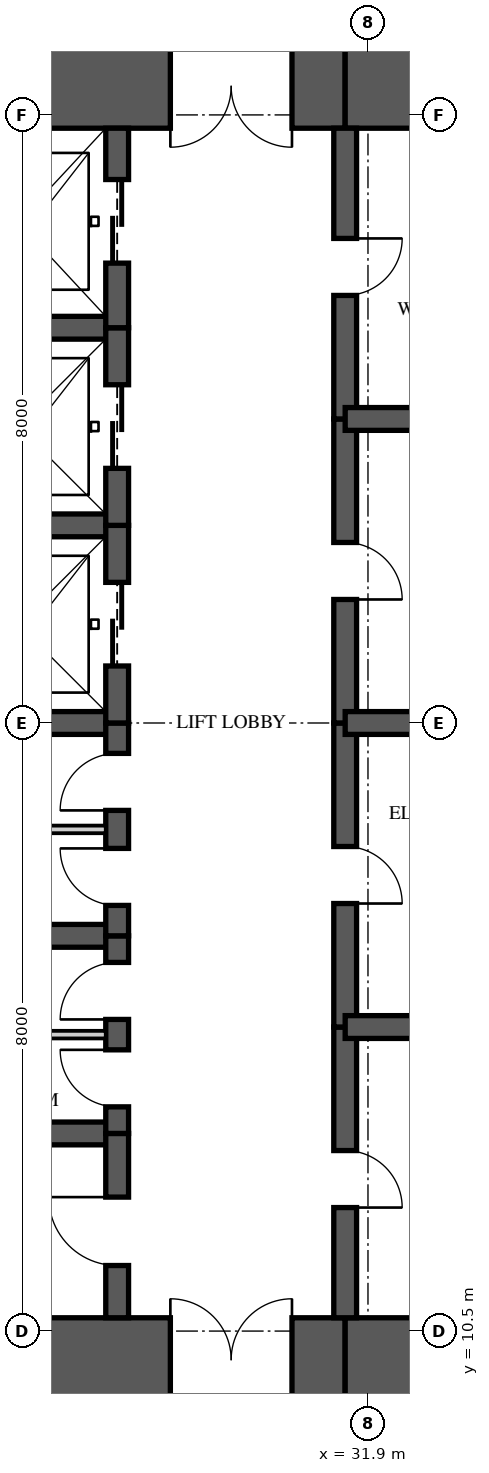
"""IFC4 building model, lengths in metres.
Left out: names, types, materials, properties, quantities, classifications, styles, units other than length and angle.
Written with IfcOpenShell. Run it as: python <this file> out.ifc"""

import sys

from ifc_helpers import new_model, si_unit, direction, frame, frame_2d, origin, place, context, subcontext, project, spatial, rectangle, extrude, element, fill, save


model = new_model("IFC4")
c1 = context("Model", 3, precision=1e-05, world=origin(), true_north=direction((0.0, 1.0)))
c2 = subcontext(c1, "Body", "Model", "MODEL_VIEW")
j1 = project(units=[si_unit("LENGTHUNIT", "METRE"), si_unit("PLANEANGLEUNIT", "RADIAN")], contexts=[c1])
p1 = place(None, origin())
s1 = spatial("IfcSite", under=j1, at=p1, CompositionType="ELEMENT")
p2 = place(p1, origin())
s2 = spatial("IfcBuilding", under=s1, at=p2, CompositionType="ELEMENT")
p3 = place(p2, frame((0.0, 0.0, 238.95)))
s3 = spatial("IfcBuildingStorey", under=s2, at=p3, CompositionType="ELEMENT", Elevation=238.95)
p4 = place(p3, frame((26.0, 10.125, 0.0), z_axis=(0.0, 0.0, 1.0), x_axis=(1.0, 0.0, 0.0)))
e1 = element("IfcWall", 1, at=p4, inside=s3, PredefinedType="SHEAR", context=c2, shape_type="SweptSolid", body=[
    extrude(rectangle(XDim=5.6, YDim=1.1, at=frame_2d((2.8, 0.0))), origin(), (0.0, 0.0, 1.0), 3.5),
])
p5 = place(p4, frame((3.3, 0.0, 0.0)))
e2 = element("IfcOpeningElement", 2, at=p5, cuts=e1, PredefinedType="OPENING", context=c2, shape_type="SweptSolid", body=[
    extrude(rectangle(XDim=1.6, YDim=2.1, at=frame_2d((0.8, 1.05))), frame((0.0, 0.56, 0.0), z_axis=(0.0, -1.0, 0.0), x_axis=(1.0, 0.0, 0.0)), (0.0, 0.0, 1.0), 1.12),
])
for number, where, z_axis, x_axis in (
    (3, (31.6, 10.125, 0.0), (0.0, 0.0, 1.0), (1.0, 0.0, 0.0)),
    (4, (35.9, 26.875, 0.0), (0.0, 0.0, 1.0), (-1.0, 0.0, 0.0)),
):
    element("IfcWall", number, at=place(p3, frame(where, z_axis=z_axis, x_axis=x_axis)), inside=s3, PredefinedType="SHEAR", context=c2, shape_type="SweptSolid", body=[
        extrude(rectangle(XDim=4.3, YDim=1.1, at=frame_2d((2.15, 0.0))), origin(), (0.0, 0.0, 1.0), 3.5),
    ])
p6 = place(p3, frame((31.6, 26.875, 0.0), z_axis=(0.0, 0.0, 1.0), x_axis=(-1.0, 0.0, 0.0)))
e5 = element("IfcWall", 5, at=p6, inside=s3, PredefinedType="SHEAR", context=c2, shape_type="SweptSolid", body=[
    extrude(rectangle(XDim=5.6, YDim=1.1, at=frame_2d((2.8, 0.0))), origin(), (0.0, 0.0, 1.0), 3.5),
])
p7 = place(p6, frame((0.7, 0.0, 0.0)))
e6 = element("IfcOpeningElement", 6, at=p7, cuts=e5, PredefinedType="OPENING", context=c2, shape_type="SweptSolid", body=[
    extrude(rectangle(XDim=1.6, YDim=2.1, at=frame_2d((0.8, 1.05))), frame((0.0, 0.56, 0.0), z_axis=(0.0, -1.0, 0.0), x_axis=(1.0, 0.0, 0.0)), (0.0, 0.0, 1.0), 1.12),
])
p8 = place(p3, frame((28.6, 10.675, 0.0), z_axis=(0.0, 0.0, 1.0), x_axis=(0.0, 1.0, 0.0)))
e7 = element("IfcWall", 7, at=p8, inside=s3, PredefinedType="SHEAR", context=c2, shape_type="SweptSolid", body=[
    extrude(rectangle(XDim=2.425, YDim=0.3, at=frame_2d((1.212, 0.0))), origin(), (0.0, 0.0, 1.0), 3.5),
])
p9 = place(p8, frame((0.688, 0.0, 0.0)))
e8 = element("IfcOpeningElement", 8, at=p9, cuts=e7, PredefinedType="OPENING", context=c2, shape_type="SweptSolid", body=[
    extrude(rectangle(XDim=0.9, YDim=2.1, at=frame_2d((0.45, 1.05))), frame((0.0, 0.16, 0.0), z_axis=(0.0, -1.0, 0.0), x_axis=(1.0, 0.0, 0.0)), (0.0, 0.0, 1.0), 0.32),
])
p10 = place(p3, frame((28.6, 13.1, 0.0), z_axis=(0.0, 0.0, 1.0), x_axis=(0.0, 1.0, 0.0)))
e9 = element("IfcWall", 9, at=p10, inside=s3, PredefinedType="SHEAR", context=c2, shape_type="SweptSolid", body=[
    extrude(rectangle(XDim=2.6, YDim=0.3, at=frame_2d((1.3, 0.0))), origin(), (0.0, 0.0, 1.0), 3.5),
])
p11 = place(p10, frame((0.35, 0.0, 0.0)))
e10 = element("IfcOpeningElement", 10, at=p11, cuts=e9, PredefinedType="OPENING", context=c2, shape_type="SweptSolid", body=[
    extrude(rectangle(XDim=0.75, YDim=2.1, at=frame_2d((0.375, 1.05))), frame((0.0, 0.16, 0.0), z_axis=(0.0, -1.0, 0.0), x_axis=(1.0, 0.0, 0.0)), (0.0, 0.0, 1.0), 0.32),
])
p12 = place(p10, frame((1.5, 0.0, 0.0)))
e11 = element("IfcOpeningElement", 11, at=p12, cuts=e9, PredefinedType="OPENING", context=c2, shape_type="SweptSolid", body=[
    extrude(rectangle(XDim=0.75, YDim=2.1, at=frame_2d((0.375, 1.05))), frame((0.0, 0.16, 0.0), z_axis=(0.0, -1.0, 0.0), x_axis=(1.0, 0.0, 0.0)), (0.0, 0.0, 1.0), 0.32),
])
p13 = place(p3, frame((28.6, 15.7, 0.0), z_axis=(0.0, 0.0, 1.0), x_axis=(0.0, 1.0, 0.0)))
e12 = element("IfcWall", 12, at=p13, inside=s3, PredefinedType="SHEAR", context=c2, shape_type="SweptSolid", body=[
    extrude(rectangle(XDim=2.8, YDim=0.3, at=frame_2d((1.4, 0.0))), origin(), (0.0, 0.0, 1.0), 3.5),
])
p14 = place(p13, frame((0.4, 0.0, 0.0)))
e13 = element("IfcOpeningElement", 13, at=p14, cuts=e12, PredefinedType="OPENING", context=c2, shape_type="SweptSolid", body=[
    extrude(rectangle(XDim=0.75, YDim=2.1, at=frame_2d((0.375, 1.05))), frame((0.0, 0.16, 0.0), z_axis=(0.0, -1.0, 0.0), x_axis=(1.0, 0.0, 0.0)), (0.0, 0.0, 1.0), 0.32),
])
p15 = place(p13, frame((1.65, 0.0, 0.0)))
e14 = element("IfcOpeningElement", 14, at=p15, cuts=e12, PredefinedType="OPENING", context=c2, shape_type="SweptSolid", body=[
    extrude(rectangle(XDim=0.75, YDim=2.1, at=frame_2d((0.375, 1.05))), frame((0.0, 0.16, 0.0), z_axis=(0.0, -1.0, 0.0), x_axis=(1.0, 0.0, 0.0)), (0.0, 0.0, 1.0), 0.32),
])
p16 = place(p3, frame((28.6, 18.5, 0.0), z_axis=(0.0, 0.0, 1.0), x_axis=(0.0, 1.0, 0.0)))
e15 = element("IfcWall", 15, at=p16, inside=s3, PredefinedType="SHEAR", context=c2, shape_type="SweptSolid", body=[
    extrude(rectangle(XDim=2.6, YDim=0.3, at=frame_2d((1.3, 0.0))), origin(), (0.0, 0.0, 1.0), 3.5),
])
p17 = place(p16, frame((0.75, 0.0, 0.0)))
e16 = element("IfcOpeningElement", 16, at=p17, cuts=e15, PredefinedType="OPENING", context=c2, shape_type="SweptSolid", body=[
    extrude(rectangle(XDim=1.1, YDim=2.1, at=frame_2d((0.55, 1.05))), frame((0.0, 0.16, 0.0), z_axis=(0.0, -1.0, 0.0), x_axis=(1.0, 0.0, 0.0)), (0.0, 0.0, 1.0), 0.32),
])
p18 = place(p3, frame((28.6, 21.1, 0.0), z_axis=(0.0, 0.0, 1.0), x_axis=(0.0, 1.0, 0.0)))
e17 = element("IfcWall", 17, at=p18, inside=s3, PredefinedType="SHEAR", context=c2, shape_type="SweptSolid", body=[
    extrude(rectangle(XDim=2.6, YDim=0.3, at=frame_2d((1.3, 0.0))), origin(), (0.0, 0.0, 1.0), 3.5),
])
p19 = place(p18, frame((0.75, 0.0, 0.0)))
e18 = element("IfcOpeningElement", 18, at=p19, cuts=e17, PredefinedType="OPENING", context=c2, shape_type="SweptSolid", body=[
    extrude(rectangle(XDim=1.1, YDim=2.1, at=frame_2d((0.55, 1.05))), frame((0.0, 0.16, 0.0), z_axis=(0.0, -1.0, 0.0), x_axis=(1.0, 0.0, 0.0)), (0.0, 0.0, 1.0), 0.32),
])
p20 = place(p3, frame((28.6, 23.7, 0.0), z_axis=(0.0, 0.0, 1.0), x_axis=(0.0, 1.0, 0.0)))
e19 = element("IfcWall", 19, at=p20, inside=s3, PredefinedType="SHEAR", context=c2, shape_type="SweptSolid", body=[
    extrude(rectangle(XDim=2.625, YDim=0.3, at=frame_2d((1.312, 0.0))), origin(), (0.0, 0.0, 1.0), 3.5),
])
p21 = place(p20, frame((0.85, 0.0, 0.0)))
e20 = element("IfcOpeningElement", 20, at=p21, cuts=e19, PredefinedType="OPENING", context=c2, shape_type="SweptSolid", body=[
    extrude(rectangle(XDim=1.1, YDim=2.1, at=frame_2d((0.55, 1.05))), frame((0.0, 0.16, 0.0), z_axis=(0.0, -1.0, 0.0), x_axis=(1.0, 0.0, 0.0)), (0.0, 0.0, 1.0), 0.32),
])
p22 = place(p3, frame((31.6, 10.675, 0.0), z_axis=(0.0, 0.0, 1.0), x_axis=(0.0, 1.0, 0.0)))
e21 = element("IfcWall", 21, at=p22, inside=s3, PredefinedType="SHEAR", context=c2, shape_type="SweptSolid", body=[
    extrude(rectangle(XDim=3.825, YDim=0.3, at=frame_2d((1.913, 0.0))), origin(), (0.0, 0.0, 1.0), 3.5),
])
p23 = place(p22, frame((1.45, 0.0, 0.0)))
e22 = element("IfcOpeningElement", 22, at=p23, cuts=e21, PredefinedType="OPENING", context=c2, shape_type="SweptSolid", body=[
    extrude(rectangle(XDim=0.75, YDim=2.1, at=frame_2d((0.375, 1.05))), frame((0.0, 0.16, 0.0), z_axis=(0.0, -1.0, 0.0), x_axis=(1.0, 0.0, 0.0)), (0.0, 0.0, 1.0), 0.32),
])
p24 = place(p3, frame((31.6, 14.5, 0.0), z_axis=(0.0, 0.0, 1.0), x_axis=(0.0, 1.0, 0.0)))
e23 = element("IfcWall", 23, at=p24, inside=s3, PredefinedType="SHEAR", context=c2, shape_type="SweptSolid", body=[
    extrude(rectangle(XDim=4.0, YDim=0.3, at=frame_2d((2.0, 0.0))), origin(), (0.0, 0.0, 1.0), 3.5),
])
p25 = place(p24, frame((1.625, 0.0, 0.0)))
e24 = element("IfcOpeningElement", 24, at=p25, cuts=e23, PredefinedType="OPENING", context=c2, shape_type="SweptSolid", body=[
    extrude(rectangle(XDim=0.75, YDim=2.1, at=frame_2d((0.375, 1.05))), frame((0.0, 0.16, 0.0), z_axis=(0.0, -1.0, 0.0), x_axis=(1.0, 0.0, 0.0)), (0.0, 0.0, 1.0), 0.32),
])
p26 = place(p3, frame((31.6, 18.5, 0.0), z_axis=(0.0, 0.0, 1.0), x_axis=(0.0, 1.0, 0.0)))
e25 = element("IfcWall", 25, at=p26, inside=s3, PredefinedType="SHEAR", context=c2, shape_type="SweptSolid", body=[
    extrude(rectangle(XDim=4.0, YDim=0.3, at=frame_2d((2.0, 0.0))), origin(), (0.0, 0.0, 1.0), 3.5),
])
p27 = place(p26, frame((1.625, 0.0, 0.0)))
e26 = element("IfcOpeningElement", 26, at=p27, cuts=e25, PredefinedType="OPENING", context=c2, shape_type="SweptSolid", body=[
    extrude(rectangle(XDim=0.75, YDim=2.1, at=frame_2d((0.375, 1.05))), frame((0.0, 0.16, 0.0), z_axis=(0.0, -1.0, 0.0), x_axis=(1.0, 0.0, 0.0)), (0.0, 0.0, 1.0), 0.32),
])
p28 = place(p3, frame((31.6, 22.5, 0.0), z_axis=(0.0, 0.0, 1.0), x_axis=(0.0, 1.0, 0.0)))
e27 = element("IfcWall", 27, at=p28, inside=s3, PredefinedType="SHEAR", context=c2, shape_type="SweptSolid", body=[
    extrude(rectangle(XDim=3.825, YDim=0.3, at=frame_2d((1.913, 0.0))), origin(), (0.0, 0.0, 1.0), 3.5),
])
p29 = place(p28, frame((1.625, 0.0, 0.0)))
e28 = element("IfcOpeningElement", 28, at=p29, cuts=e27, PredefinedType="OPENING", context=c2, shape_type="SweptSolid", body=[
    extrude(rectangle(XDim=0.75, YDim=2.1, at=frame_2d((0.375, 1.05))), frame((0.0, 0.16, 0.0), z_axis=(0.0, -1.0, 0.0), x_axis=(1.0, 0.0, 0.0)), (0.0, 0.0, 1.0), 0.32),
])
for number, where, z_axis, x_axis in (
    (29, (26.0, 13.1, 0.0), (0.0, 0.0, 1.0), (1.0, 0.0, 0.0)),
    (30, (26.0, 15.7, 0.0), (0.0, 0.0, 1.0), (1.0, 0.0, 0.0)),
    (31, (26.0, 18.5, 0.0), (0.0, 0.0, 1.0), (1.0, 0.0, 0.0)),
    (32, (26.0, 21.1, 0.0), (0.0, 0.0, 1.0), (1.0, 0.0, 0.0)),
    (33, (26.0, 23.7, 0.0), (0.0, 0.0, 1.0), (1.0, 0.0, 0.0)),
):
    element("IfcWall", number, at=place(p3, frame(where, z_axis=z_axis, x_axis=x_axis)), inside=s3, PredefinedType="SHEAR", context=c2, shape_type="SweptSolid", body=[
        extrude(rectangle(XDim=2.6, YDim=0.3, at=frame_2d((1.3, 0.0))), origin(), (0.0, 0.0, 1.0), 3.5),
    ])
for number, where, z_axis, x_axis in (
    (34, (31.6, 14.5, 0.0), (0.0, 0.0, 1.0), (1.0, 0.0, 0.0)),
    (35, (31.6, 18.5, 0.0), (0.0, 0.0, 1.0), (1.0, 0.0, 0.0)),
    (36, (31.6, 22.5, 0.0), (0.0, 0.0, 1.0), (1.0, 0.0, 0.0)),
):
    element("IfcWall", number, at=place(p3, frame(where, z_axis=z_axis, x_axis=x_axis)), inside=s3, PredefinedType="SHEAR", context=c2, shape_type="SweptSolid", body=[
        extrude(rectangle(XDim=4.3, YDim=0.3, at=frame_2d((2.15, 0.0))), origin(), (0.0, 0.0, 1.0), 3.5),
    ])
for number, where, z_axis, x_axis in (
    (37, (26.15, 14.4, 0.0), (0.0, 0.0, 1.0), (1.0, 0.0, 0.0)),
    (38, (26.15, 17.1, 0.0), (0.0, 0.0, 1.0), (1.0, 0.0, 0.0)),
):
    element("IfcWall", number, at=place(p3, frame(where, z_axis=z_axis, x_axis=x_axis)), inside=s3, PredefinedType="PARTITIONING", context=c2, shape_type="SweptSolid", body=[
        extrude(rectangle(XDim=2.3, YDim=0.1, at=frame_2d((1.15, 0.0))), origin(), (0.0, 0.0, 1.0), 3.26),
    ])
p30 = place(p17, origin())
e39 = element("IfcDoor", 39, at=p30, inside=s3, OperationType="SLIDING_TO_LEFT", PredefinedType="DOOR", context=c2, shape_type="SweptSolid", body=[
    extrude(rectangle(XDim=1.1, YDim=2.1, at=frame_2d((0.55, 1.05))), frame((0.0, 0.025, 0.0), z_axis=(0.0, -1.0, 0.0), x_axis=(1.0, 0.0, 0.0)), (0.0, 0.0, 1.0), 0.05),
])
fill(e16, e39)
p31 = place(p19, origin())
e40 = element("IfcDoor", 40, at=p31, inside=s3, OperationType="SLIDING_TO_LEFT", PredefinedType="DOOR", context=c2, shape_type="SweptSolid", body=[
    extrude(rectangle(XDim=1.1, YDim=2.1, at=frame_2d((0.55, 1.05))), frame((0.0, 0.025, 0.0), z_axis=(0.0, -1.0, 0.0), x_axis=(1.0, 0.0, 0.0)), (0.0, 0.0, 1.0), 0.05),
])
fill(e18, e40)
p32 = place(p21, origin())
e41 = element("IfcDoor", 41, at=p32, inside=s3, OperationType="SLIDING_TO_LEFT", PredefinedType="DOOR", context=c2, shape_type="SweptSolid", body=[
    extrude(rectangle(XDim=1.1, YDim=2.1, at=frame_2d((0.55, 1.05))), frame((0.0, 0.025, 0.0), z_axis=(0.0, -1.0, 0.0), x_axis=(1.0, 0.0, 0.0)), (0.0, 0.0, 1.0), 0.05),
])
fill(e20, e41)
p33 = place(p9, origin())
e42 = element("IfcDoor", 42, at=p33, inside=s3, OperationType="SINGLE_SWING_RIGHT", PredefinedType="DOOR", context=c2, shape_type="SweptSolid", body=[
    extrude(rectangle(XDim=0.9, YDim=2.1, at=frame_2d((0.45, 1.05))), frame((0.0, 0.025, 0.0), z_axis=(0.0, -1.0, 0.0), x_axis=(1.0, 0.0, 0.0)), (0.0, 0.0, 1.0), 0.05),
])
fill(e8, e42)
p34 = place(p11, origin())
e43 = element("IfcDoor", 43, at=p34, inside=s3, OperationType="SINGLE_SWING_RIGHT", PredefinedType="DOOR", context=c2, shape_type="SweptSolid", body=[
    extrude(rectangle(XDim=0.75, YDim=2.1, at=frame_2d((0.375, 1.05))), frame((0.0, 0.025, 0.0), z_axis=(0.0, -1.0, 0.0), x_axis=(1.0, 0.0, 0.0)), (0.0, 0.0, 1.0), 0.05),
])
fill(e10, e43)
p35 = place(p12, origin())
e44 = element("IfcDoor", 44, at=p35, inside=s3, OperationType="SINGLE_SWING_LEFT", PredefinedType="DOOR", context=c2, shape_type="SweptSolid", body=[
    extrude(rectangle(XDim=0.75, YDim=2.1, at=frame_2d((0.375, 1.05))), frame((0.0, 0.025, 0.0), z_axis=(0.0, -1.0, 0.0), x_axis=(1.0, 0.0, 0.0)), (0.0, 0.0, 1.0), 0.05),
])
fill(e11, e44)
p36 = place(p14, origin())
e45 = element("IfcDoor", 45, at=p36, inside=s3, OperationType="SINGLE_SWING_RIGHT", PredefinedType="DOOR", context=c2, shape_type="SweptSolid", body=[
    extrude(rectangle(XDim=0.75, YDim=2.1, at=frame_2d((0.375, 1.05))), frame((0.0, 0.025, 0.0), z_axis=(0.0, -1.0, 0.0), x_axis=(1.0, 0.0, 0.0)), (0.0, 0.0, 1.0), 0.05),
])
fill(e13, e45)
p37 = place(p15, origin())
e46 = element("IfcDoor", 46, at=p37, inside=s3, OperationType="SINGLE_SWING_LEFT", PredefinedType="DOOR", context=c2, shape_type="SweptSolid", body=[
    extrude(rectangle(XDim=0.75, YDim=2.1, at=frame_2d((0.375, 1.05))), frame((0.0, 0.025, 0.0), z_axis=(0.0, -1.0, 0.0), x_axis=(1.0, 0.0, 0.0)), (0.0, 0.0, 1.0), 0.05),
])
fill(e14, e46)
p38 = place(p5, origin())
e47 = element("IfcDoor", 47, at=p38, inside=s3, OperationType="DOUBLE_DOOR_SINGLE_SWING", PredefinedType="DOOR", context=c2, shape_type="SweptSolid", body=[
    extrude(rectangle(XDim=1.6, YDim=2.1, at=frame_2d((0.8, 1.05))), frame((0.0, 0.025, 0.0), z_axis=(0.0, -1.0, 0.0), x_axis=(1.0, 0.0, 0.0)), (0.0, 0.0, 1.0), 0.05),
])
fill(e2, e47)
p39 = place(p7, origin())
e48 = element("IfcDoor", 48, at=p39, inside=s3, OperationType="DOUBLE_DOOR_SINGLE_SWING", PredefinedType="DOOR", context=c2, shape_type="SweptSolid", body=[
    extrude(rectangle(XDim=1.6, YDim=2.1, at=frame_2d((0.8, 1.05))), frame((0.0, 0.025, 0.0), z_axis=(0.0, -1.0, 0.0), x_axis=(1.0, 0.0, 0.0)), (0.0, 0.0, 1.0), 0.05),
])
fill(e6, e48)
p40 = place(p23, frame((0.75, 0.0, 0.0), z_axis=(0.0, 0.0, 1.0), x_axis=(-1.0, 0.0, 0.0)))
e49 = element("IfcDoor", 49, at=p40, inside=s3, OperationType="SINGLE_SWING_RIGHT", PredefinedType="DOOR", context=c2, shape_type="SweptSolid", body=[
    extrude(rectangle(XDim=0.75, YDim=2.1, at=frame_2d((0.375, 1.05))), frame((0.0, 0.025, 0.0), z_axis=(0.0, -1.0, 0.0), x_axis=(1.0, 0.0, 0.0)), (0.0, 0.0, 1.0), 0.05),
])
fill(e22, e49)
p41 = place(p25, frame((0.75, 0.0, 0.0), z_axis=(0.0, 0.0, 1.0), x_axis=(-1.0, 0.0, 0.0)))
e50 = element("IfcDoor", 50, at=p41, inside=s3, OperationType="SINGLE_SWING_RIGHT", PredefinedType="DOOR", context=c2, shape_type="SweptSolid", body=[
    extrude(rectangle(XDim=0.75, YDim=2.1, at=frame_2d((0.375, 1.05))), frame((0.0, 0.025, 0.0), z_axis=(0.0, -1.0, 0.0), x_axis=(1.0, 0.0, 0.0)), (0.0, 0.0, 1.0), 0.05),
])
fill(e24, e50)
p42 = place(p27, frame((0.75, 0.0, 0.0), z_axis=(0.0, 0.0, 1.0), x_axis=(-1.0, 0.0, 0.0)))
e51 = element("IfcDoor", 51, at=p42, inside=s3, OperationType="SINGLE_SWING_RIGHT", PredefinedType="DOOR", context=c2, shape_type="SweptSolid", body=[
    extrude(rectangle(XDim=0.75, YDim=2.1, at=frame_2d((0.375, 1.05))), frame((0.0, 0.025, 0.0), z_axis=(0.0, -1.0, 0.0), x_axis=(1.0, 0.0, 0.0)), (0.0, 0.0, 1.0), 0.05),
])
fill(e26, e51)
p43 = place(p29, frame((0.75, 0.0, 0.0), z_axis=(0.0, 0.0, 1.0), x_axis=(-1.0, 0.0, 0.0)))
e52 = element("IfcDoor", 52, at=p43, inside=s3, OperationType="SINGLE_SWING_LEFT", PredefinedType="DOOR", context=c2, shape_type="SweptSolid", body=[
    extrude(rectangle(XDim=0.75, YDim=2.1, at=frame_2d((0.375, 1.05))), frame((0.0, 0.025, 0.0), z_axis=(0.0, -1.0, 0.0), x_axis=(1.0, 0.0, 0.0)), (0.0, 0.0, 1.0), 0.05),
])
fill(e28, e52)
save(model, sys.argv[1])
